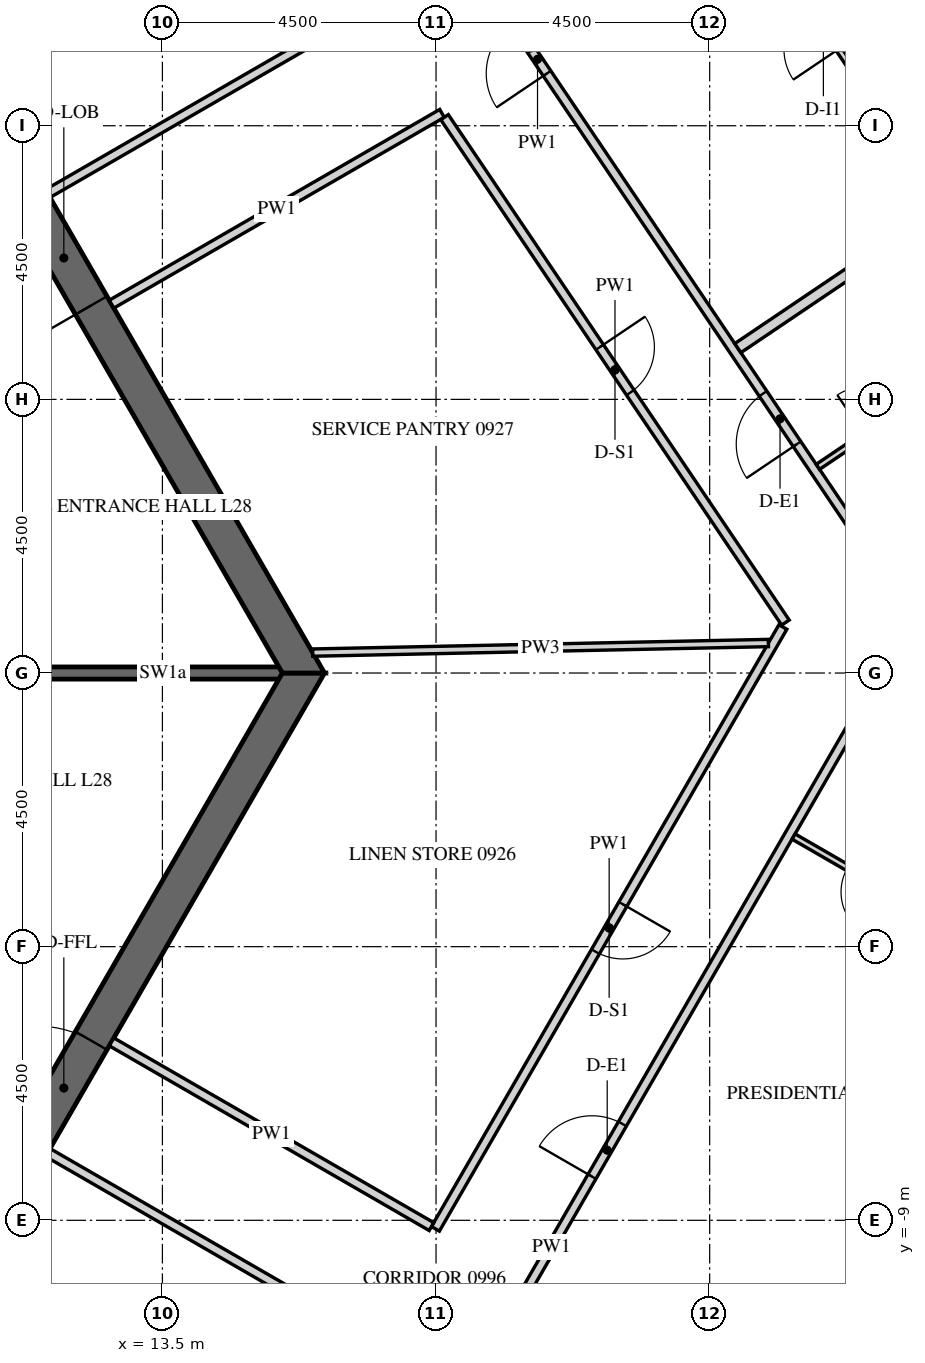
"""IFC4 building model, lengths in metres.
Left out: names, types, materials, properties, quantities, classifications, styles, units other than length and angle.
Written with IfcOpenShell. Run it as: python <this file> out.ifc"""

import sys

from ifc_helpers import new_model, si_unit, direction, frame, frame_2d, origin, place, context, subcontext, project, spatial, polyline, rectangle, outline, extrude, element, fill, save


model = new_model("IFC4")
c1 = context("Model", 3, precision=1e-05, world=origin(), true_north=direction((0.0, 1.0)))
c2 = subcontext(c1, "Body", "Model", "MODEL_VIEW")
j1 = project(units=[si_unit("LENGTHUNIT", "METRE"), si_unit("PLANEANGLEUNIT", "RADIAN")], contexts=[c1])
p1 = place(None, origin())
s1 = spatial("IfcSite", under=j1, at=p1, CompositionType="ELEMENT")
p2 = place(p1, origin())
s2 = spatial("IfcBuilding", under=s1, at=p2, CompositionType="ELEMENT")
p3 = place(p2, frame((0.0, 0.0, 123.3)))
s3 = spatial("IfcBuildingStorey", under=s2, at=p3, CompositionType="ELEMENT", Elevation=123.3)
p4 = place(p3, frame((18.83, -26.835, -0.15), z_axis=(0.0, 0.0, 1.0), x_axis=(0.500003800416, 0.866023209602, 0.0)))
e1 = element("IfcWall", 1, at=p4, inside=s3, PredefinedType="SOLIDWALL", context=c2, shape_type="SweptSolid", body=[
    extrude(outline(polyline([(-0.022, -0.275), (30.097, -0.275), (30.045, 0.275), (0.022, 0.275), (-0.022, -0.275)])), origin(), (0.0, 0.0, 1.0), 3.9),
])
p5 = place(p4, frame((1.236, 0.0, 1.05)))
e2 = element("IfcOpeningElement", 2, at=p5, cuts=e1, PredefinedType="OPENING", context=c2, shape_type="SweptSolid", body=[
    extrude(rectangle(XDim=2.4, YDim=2.4, at=frame_2d((1.2, 1.2))), frame((0.0, 0.285, 0.0), z_axis=(0.0, -1.0, 0.0), x_axis=(1.0, 0.0, 0.0)), (0.0, 0.0, 1.0), 0.57),
])
p6 = place(p4, frame((4.835, 0.0, 1.05)))
e3 = element("IfcOpeningElement", 3, at=p6, cuts=e1, PredefinedType="OPENING", context=c2, shape_type="SweptSolid", body=[
    extrude(rectangle(XDim=2.4, YDim=2.4, at=frame_2d((1.2, 1.2))), frame((0.0, 0.285, 0.0), z_axis=(0.0, -1.0, 0.0), x_axis=(1.0, 0.0, 0.0)), (0.0, 0.0, 1.0), 0.57),
])
p7 = place(p4, frame((8.436, 0.0, 1.05)))
e4 = element("IfcOpeningElement", 4, at=p7, cuts=e1, PredefinedType="OPENING", context=c2, shape_type="SweptSolid", body=[
    extrude(rectangle(XDim=2.4, YDim=2.4, at=frame_2d((1.2, 1.2))), frame((0.0, 0.285, 0.0), z_axis=(0.0, -1.0, 0.0), x_axis=(1.0, 0.0, 0.0)), (0.0, 0.0, 1.0), 0.57),
])
p8 = place(p4, frame((12.035, 0.0, 1.05)))
e5 = element("IfcOpeningElement", 5, at=p8, cuts=e1, PredefinedType="OPENING", context=c2, shape_type="SweptSolid", body=[
    extrude(rectangle(XDim=2.4, YDim=2.4, at=frame_2d((1.2, 1.2))), frame((0.0, 0.285, 0.0), z_axis=(0.0, -1.0, 0.0), x_axis=(1.0, 0.0, 0.0)), (0.0, 0.0, 1.0), 0.57),
])
p9 = place(p4, frame((15.635, 0.0, 1.05)))
e6 = element("IfcOpeningElement", 6, at=p9, cuts=e1, PredefinedType="OPENING", context=c2, shape_type="SweptSolid", body=[
    extrude(rectangle(XDim=2.4, YDim=2.4, at=frame_2d((1.2, 1.2))), frame((0.0, 0.285, 0.0), z_axis=(0.0, -1.0, 0.0), x_axis=(1.0, 0.0, 0.0)), (0.0, 0.0, 1.0), 0.57),
])
p10 = place(p4, frame((19.236, 0.0, 1.05)))
e7 = element("IfcOpeningElement", 7, at=p10, cuts=e1, PredefinedType="OPENING", context=c2, shape_type="SweptSolid", body=[
    extrude(rectangle(XDim=2.4, YDim=2.4, at=frame_2d((1.2, 1.2))), frame((0.0, 0.285, 0.0), z_axis=(0.0, -1.0, 0.0), x_axis=(1.0, 0.0, 0.0)), (0.0, 0.0, 1.0), 0.57),
])
p11 = place(p4, frame((22.835, 0.0, 1.05)))
e8 = element("IfcOpeningElement", 8, at=p11, cuts=e1, PredefinedType="OPENING", context=c2, shape_type="SweptSolid", body=[
    extrude(rectangle(XDim=2.4, YDim=2.4, at=frame_2d((1.2, 1.2))), frame((0.0, 0.285, 0.0), z_axis=(0.0, -1.0, 0.0), x_axis=(1.0, 0.0, 0.0)), (0.0, 0.0, 1.0), 0.57),
])
p12 = place(p4, frame((26.436, 0.0, 1.05)))
e9 = element("IfcOpeningElement", 9, at=p12, cuts=e1, PredefinedType="OPENING", context=c2, shape_type="SweptSolid", body=[
    extrude(rectangle(XDim=2.4, YDim=2.4, at=frame_2d((1.2, 1.2))), frame((0.0, 0.285, 0.0), z_axis=(0.0, -1.0, 0.0), x_axis=(1.0, 0.0, 0.0)), (0.0, 0.0, 1.0), 0.57),
])
p13 = place(p3, frame((33.728, 3.153, -0.15), z_axis=(0.0, 0.0, 1.0), x_axis=(-0.559192411416, 0.82903790445, 0.0)))
e10 = element("IfcWall", 10, at=p13, inside=s3, PredefinedType="SOLIDWALL", context=c2, shape_type="SweptSolid", body=[
    extrude(outline(polyline([(-0.026, -0.275), (30.093, -0.275), (30.048, 0.275), (0.026, 0.275), (-0.026, -0.275)])), origin(), (0.0, 0.0, 1.0), 3.9),
])
p14 = place(p13, frame((1.236, 0.0, 1.05)))
e11 = element("IfcOpeningElement", 11, at=p14, cuts=e10, PredefinedType="OPENING", context=c2, shape_type="SweptSolid", body=[
    extrude(rectangle(XDim=2.4, YDim=2.4, at=frame_2d((1.2, 1.2))), frame((0.0, 0.285, 0.0), z_axis=(0.0, -1.0, 0.0), x_axis=(1.0, 0.0, 0.0)), (0.0, 0.0, 1.0), 0.57),
])
p15 = place(p13, frame((4.835, 0.0, 1.05)))
e12 = element("IfcOpeningElement", 12, at=p15, cuts=e10, PredefinedType="OPENING", context=c2, shape_type="SweptSolid", body=[
    extrude(rectangle(XDim=2.4, YDim=2.4, at=frame_2d((1.2, 1.2))), frame((0.0, 0.285, 0.0), z_axis=(0.0, -1.0, 0.0), x_axis=(1.0, 0.0, 0.0)), (0.0, 0.0, 1.0), 0.57),
])
p16 = place(p13, frame((8.436, 0.0, 1.05)))
e13 = element("IfcOpeningElement", 13, at=p16, cuts=e10, PredefinedType="OPENING", context=c2, shape_type="SweptSolid", body=[
    extrude(rectangle(XDim=2.4, YDim=2.4, at=frame_2d((1.2, 1.2))), frame((0.0, 0.285, 0.0), z_axis=(0.0, -1.0, 0.0), x_axis=(1.0, 0.0, 0.0)), (0.0, 0.0, 1.0), 0.57),
])
p17 = place(p13, frame((12.035, 0.0, 1.05)))
e14 = element("IfcOpeningElement", 14, at=p17, cuts=e10, PredefinedType="OPENING", context=c2, shape_type="SweptSolid", body=[
    extrude(rectangle(XDim=2.4, YDim=2.4, at=frame_2d((1.2, 1.2))), frame((0.0, 0.285, 0.0), z_axis=(0.0, -1.0, 0.0), x_axis=(1.0, 0.0, 0.0)), (0.0, 0.0, 1.0), 0.57),
])
p18 = place(p13, frame((15.635, 0.0, 1.05)))
e15 = element("IfcOpeningElement", 15, at=p18, cuts=e10, PredefinedType="OPENING", context=c2, shape_type="SweptSolid", body=[
    extrude(rectangle(XDim=2.4, YDim=2.4, at=frame_2d((1.2, 1.2))), frame((0.0, 0.285, 0.0), z_axis=(0.0, -1.0, 0.0), x_axis=(1.0, 0.0, 0.0)), (0.0, 0.0, 1.0), 0.57),
])
p19 = place(p13, frame((19.236, 0.0, 1.05)))
e16 = element("IfcOpeningElement", 16, at=p19, cuts=e10, PredefinedType="OPENING", context=c2, shape_type="SweptSolid", body=[
    extrude(rectangle(XDim=2.4, YDim=2.4, at=frame_2d((1.2, 1.2))), frame((0.0, 0.285, 0.0), z_axis=(0.0, -1.0, 0.0), x_axis=(1.0, 0.0, 0.0)), (0.0, 0.0, 1.0), 0.57),
])
p20 = place(p13, frame((22.835, 0.0, 1.05)))
e17 = element("IfcOpeningElement", 17, at=p20, cuts=e10, PredefinedType="OPENING", context=c2, shape_type="SweptSolid", body=[
    extrude(rectangle(XDim=2.4, YDim=2.4, at=frame_2d((1.2, 1.2))), frame((0.0, 0.285, 0.0), z_axis=(0.0, -1.0, 0.0), x_axis=(1.0, 0.0, 0.0)), (0.0, 0.0, 1.0), 0.57),
])
p21 = place(p13, frame((26.436, 0.0, 1.05)))
e18 = element("IfcOpeningElement", 18, at=p21, cuts=e10, PredefinedType="OPENING", context=c2, shape_type="SweptSolid", body=[
    extrude(rectangle(XDim=2.4, YDim=2.4, at=frame_2d((1.2, 1.2))), frame((0.0, 0.285, 0.0), z_axis=(0.0, -1.0, 0.0), x_axis=(1.0, 0.0, 0.0)), (0.0, 0.0, 1.0), 0.57),
])
p22 = place(p3, frame((7.91, -13.7, -0.15), z_axis=(0.0, 0.0, 1.0), x_axis=(0.499999880136, 0.866025472988, 0.0)))
e19 = element("IfcWall", 19, at=p22, inside=s3, PredefinedType="SHEAR", context=c2, shape_type="SweptSolid", body=[
    extrude(outline(polyline([(-0.173, -0.3), (15.993, -0.3), (15.646, 0.3), (0.173, 0.3), (-0.173, -0.3)])), origin(), (0.0, 0.0, 1.0), 3.9),
])
p23 = place(p22, frame((7.039, 0.0, 0.15)))
e20 = element("IfcOpeningElement", 20, at=p23, cuts=e19, PredefinedType="OPENING", context=c2, shape_type="SweptSolid", body=[
    extrude(rectangle(XDim=1.8, YDim=2.4, at=frame_2d((0.9, 1.2))), frame((0.0, 0.31, 0.0), z_axis=(0.0, -1.0, 0.0), x_axis=(1.0, 0.0, 0.0)), (0.0, 0.0, 1.0), 0.62),
])
p24 = place(p3, frame((15.819, 0.0, -0.15), z_axis=(0.0, 0.0, 1.0), x_axis=(-0.499999880136, 0.866025472988, 0.0)))
e21 = element("IfcWall", 21, at=p24, inside=s3, PredefinedType="SHEAR", context=c2, shape_type="SweptSolid", body=[
    extrude(outline(polyline([(-0.173, -0.3), (15.993, -0.3), (15.646, 0.3), (0.173, 0.3), (-0.173, -0.3)])), origin(), (0.0, 0.0, 1.0), 3.9),
])
p25 = place(p24, frame((6.981, 0.0, 0.15)))
e22 = element("IfcOpeningElement", 22, at=p25, cuts=e21, PredefinedType="OPENING", context=c2, shape_type="SweptSolid", body=[
    extrude(rectangle(XDim=1.8, YDim=2.4, at=frame_2d((0.9, 1.2))), frame((0.0, 0.31, 0.0), z_axis=(0.0, -1.0, 0.0), x_axis=(1.0, 0.0, 0.0)), (0.0, 0.0, 1.0), 0.62),
])
p26 = place(p3, frame((11.547, 0.0, -0.15), z_axis=(0.0, 0.0, 1.0), x_axis=(1.0, 0.0, 0.0)))
e23 = element("IfcWall", 23, at=p26, inside=s3, PredefinedType="SHEAR", context=c2, shape_type="SweptSolid", body=[
    extrude(rectangle(XDim=3.926, YDim=0.2, at=frame_2d((1.963, 0.0))), origin(), (0.0, 0.0, 1.0), 3.9),
])
p27 = place(p3, frame((13.928, -19.775, 0.0), z_axis=(0.0, 0.0, 1.0), x_axis=(0.50000450071, 0.866022805283, 0.0)))
e24 = element("IfcWall", 24, at=p27, inside=s3, PredefinedType="PARTITIONING", context=c2, shape_type="SweptSolid", body=[
    extrude(rectangle(XDim=23.877, YDim=0.15, at=frame_2d((11.938, 0.0))), origin(), (0.0, 0.0, 1.0), 2.988),
])
p28 = place(p27, frame((2.043, 0.0, 0.0)))
e25 = element("IfcOpeningElement", 25, at=p28, cuts=e24, PredefinedType="OPENING", context=c2, shape_type="SweptSolid", body=[
    extrude(rectangle(XDim=1.0, YDim=2.1, at=frame_2d((0.5, 1.05))), frame((0.0, 0.085, 0.0), z_axis=(0.0, -1.0, 0.0), x_axis=(1.0, 0.0, 0.0)), (0.0, 0.0, 1.0), 0.17),
])
p29 = place(p27, frame((13.272, 0.0, 0.0)))
e26 = element("IfcOpeningElement", 26, at=p29, cuts=e24, PredefinedType="OPENING", context=c2, shape_type="SweptSolid", body=[
    extrude(rectangle(XDim=1.0, YDim=2.1, at=frame_2d((0.5, 1.05))), frame((0.0, 0.085, 0.0), z_axis=(0.0, -1.0, 0.0), x_axis=(1.0, 0.0, 0.0)), (0.0, 0.0, 1.0), 0.17),
])
p30 = place(p3, frame((25.821, 0.972, 0.0), z_axis=(0.0, 0.0, 1.0), x_axis=(-0.559193816298, 0.829036956845, 0.0)))
e27 = element("IfcWall", 27, at=p30, inside=s3, PredefinedType="PARTITIONING", context=c2, shape_type="SweptSolid", body=[
    extrude(rectangle(XDim=22.002, YDim=0.15, at=frame_2d((11.001, 0.0))), origin(), (0.0, 0.0, 1.0), 2.988),
])
p31 = place(p30, frame((3.369, 0.0, 0.0)))
e28 = element("IfcOpeningElement", 28, at=p31, cuts=e27, PredefinedType="OPENING", context=c2, shape_type="SweptSolid", body=[
    extrude(rectangle(XDim=1.0, YDim=2.1, at=frame_2d((0.5, 1.05))), frame((0.0, 0.085, 0.0), z_axis=(0.0, -1.0, 0.0), x_axis=(1.0, 0.0, 0.0)), (0.0, 0.0, 1.0), 0.17),
])
p32 = place(p30, frame((10.721, 0.0, 0.0)))
e29 = element("IfcOpeningElement", 29, at=p32, cuts=e27, PredefinedType="OPENING", context=c2, shape_type="SweptSolid", body=[
    extrude(rectangle(XDim=1.0, YDim=2.1, at=frame_2d((0.5, 1.05))), frame((0.0, 0.085, 0.0), z_axis=(0.0, -1.0, 0.0), x_axis=(1.0, 0.0, 0.0)), (0.0, 0.0, 1.0), 0.17),
])
p33 = place(p30, frame((20.852, 0.0, 0.0)))
e30 = element("IfcOpeningElement", 30, at=p33, cuts=e27, PredefinedType="OPENING", context=c2, shape_type="SweptSolid", body=[
    extrude(rectangle(XDim=1.0, YDim=2.1, at=frame_2d((0.5, 1.05))), frame((0.0, 0.085, 0.0), z_axis=(0.0, -1.0, 0.0), x_axis=(1.0, 0.0, 0.0)), (0.0, 0.0, 1.0), 0.17),
])
p34 = place(p3, frame((23.704, 0.757, 0.0), z_axis=(0.0, 0.0, 1.0), x_axis=(-0.500010297365, -0.866019458516, 0.0)))
e31 = element("IfcWall", 31, at=p34, inside=s3, PredefinedType="PARTITIONING", context=c2, shape_type="SweptSolid", body=[
    extrude(rectangle(XDim=11.429, YDim=0.15, at=frame_2d((5.714, 0.0))), origin(), (0.0, 0.0, 1.0), 2.988),
])
p35 = place(p34, frame((5.264, 0.0, 0.0)))
e32 = element("IfcOpeningElement", 32, at=p35, cuts=e31, PredefinedType="OPENING", context=c2, shape_type="SweptSolid", body=[
    extrude(rectangle(XDim=0.9, YDim=2.1, at=frame_2d((0.45, 1.05))), frame((0.0, 0.085, 0.0), z_axis=(0.0, -1.0, 0.0), x_axis=(1.0, 0.0, 0.0)), (0.0, 0.0, 1.0), 0.17),
])
p36 = place(p3, frame((17.925, -9.103, 0.0), z_axis=(0.0, 0.0, 1.0), x_axis=(-0.866013586754, 0.500020467139, 0.0)))
e33 = element("IfcWall", 33, at=p36, inside=s3, PredefinedType="PARTITIONING", context=c2, shape_type="SweptSolid", body=[
    extrude(rectangle(XDim=6.075, YDim=0.15, at=frame_2d((3.038, 0.0))), origin(), (0.0, 0.0, 1.0), 2.988),
])
p37 = place(p3, frame((12.664, 6.066, 0.0), z_axis=(0.0, 0.0, 1.0), x_axis=(0.866036561919, 0.499980673046, 0.0)))
e34 = element("IfcWall", 34, at=p37, inside=s3, PredefinedType="PARTITIONING", context=c2, shape_type="SweptSolid", body=[
    extrude(rectangle(XDim=6.275, YDim=0.15, at=frame_2d((3.137, 0.0))), origin(), (0.0, 0.0, 1.0), 2.988),
])
p38 = place(p3, frame((18.14, 9.141, 0.0), z_axis=(0.0, 0.0, 1.0), x_axis=(0.55918799196, -0.829040885389, 0.0)))
e35 = element("IfcWall", 35, at=p38, inside=s3, PredefinedType="PARTITIONING", context=c2, shape_type="SweptSolid", body=[
    extrude(rectangle(XDim=10.025, YDim=0.15, at=frame_2d((5.013, 0.0))), origin(), (0.0, 0.0, 1.0), 2.988),
])
p39 = place(p38, frame((4.563, 0.0, 0.0)))
e36 = element("IfcOpeningElement", 36, at=p39, cuts=e35, PredefinedType="OPENING", context=c2, shape_type="SweptSolid", body=[
    extrude(rectangle(XDim=0.9, YDim=2.1, at=frame_2d((0.45, 1.05))), frame((0.0, 0.085, 0.0), z_axis=(0.0, -1.0, 0.0), x_axis=(1.0, 0.0, 0.0)), (0.0, 0.0, 1.0), 0.17),
])
p40 = place(p3, frame((11.614, -7.884, 0.0), z_axis=(0.0, 0.0, 1.0), x_axis=(0.866033542371, -0.499985903289, 0.0)))
e37 = element("IfcWall", 37, at=p40, inside=s3, PredefinedType="PARTITIONING", context=c2, shape_type="SweptSolid", body=[
    extrude(rectangle(XDim=6.15, YDim=0.15, at=frame_2d((3.075, 0.0))), origin(), (0.0, 0.0, 1.0), 2.988),
])
p41 = place(p3, frame((16.855, 10.911, 0.0), z_axis=(0.0, 0.0, 1.0), x_axis=(-0.866020343444, -0.500008764664, 0.0)))
e38 = element("IfcWall", 38, at=p41, inside=s3, PredefinedType="PARTITIONING", context=c2, shape_type="SweptSolid", body=[
    extrude(rectangle(XDim=6.053, YDim=0.15, at=frame_2d((3.026, 0.0))), origin(), (0.0, 0.0, 1.0), 2.988),
])
p42 = place(p3, frame((26.413, -4.152, 0.0), z_axis=(0.0, 0.0, 1.0), x_axis=(-0.86601045545, 0.500025890382, 0.0)))
e39 = element("IfcWall", 39, at=p42, inside=s3, PredefinedType="PARTITIONING", context=c2, shape_type="SweptSolid", body=[
    extrude(rectangle(XDim=2.925, YDim=0.1, at=frame_2d((1.462, 0.0))), origin(), (0.0, 0.0, 1.0), 2.988),
])
p43 = place(p42, frame((1.1, 0.0, 0.0)))
e40 = element("IfcOpeningElement", 40, at=p43, cuts=e39, PredefinedType="OPENING", context=c2, shape_type="SweptSolid", body=[
    extrude(rectangle(XDim=0.8, YDim=2.1, at=frame_2d((0.4, 1.05))), frame((0.0, 0.06, 0.0), z_axis=(0.0, -1.0, 0.0), x_axis=(1.0, 0.0, 0.0)), (0.0, 0.0, 1.0), 0.12),
])
p44 = place(p3, frame((22.017, -15.366, 0.0), z_axis=(0.0, 0.0, 1.0), x_axis=(0.5000167099, 0.866015756104, 0.0)))
e41 = element("IfcWall", 41, at=p44, inside=s3, PredefinedType="PARTITIONING", context=c2, shape_type="SweptSolid", body=[
    extrude(rectangle(XDim=7.11, YDim=0.1, at=frame_2d((3.555, 0.0))), origin(), (0.0, 0.0, 1.0), 2.988),
])
p45 = place(p44, frame((3.06, 0.0, 0.0)))
e42 = element("IfcOpeningElement", 42, at=p45, cuts=e41, PredefinedType="OPENING", context=c2, shape_type="SweptSolid", body=[
    extrude(rectangle(XDim=0.9, YDim=2.1, at=frame_2d((0.45, 1.05))), frame((0.0, 0.06, 0.0), z_axis=(0.0, -1.0, 0.0), x_axis=(1.0, 0.0, 0.0)), (0.0, 0.0, 1.0), 0.12),
])
p46 = place(p3, frame((24.28, 3.391, 0.0), z_axis=(0.0, 0.0, 1.0), x_axis=(0.829005477618, 0.559240483226, 0.0)))
e43 = element("IfcWall", 43, at=p46, inside=s3, PredefinedType="PARTITIONING", context=c2, shape_type="SweptSolid", body=[
    extrude(rectangle(XDim=2.725, YDim=0.1, at=frame_2d((1.363, 0.0))), origin(), (0.0, 0.0, 1.0), 2.988),
])
p47 = place(p46, frame((0.925, 0.0, 0.0)))
e44 = element("IfcOpeningElement", 44, at=p47, cuts=e43, PredefinedType="OPENING", context=c2, shape_type="SweptSolid", body=[
    extrude(rectangle(XDim=0.8, YDim=2.1, at=frame_2d((0.4, 1.05))), frame((0.0, 0.06, 0.0), z_axis=(0.0, -1.0, 0.0), x_axis=(1.0, 0.0, 0.0)), (0.0, 0.0, 1.0), 0.12),
])
p48 = place(p3, frame((29.119, 9.495, 0.0), z_axis=(0.0, 0.0, 1.0), x_axis=(-0.829038452737, -0.559191598545, 0.0)))
e45 = element("IfcWall", 45, at=p48, inside=s3, PredefinedType="PARTITIONING", context=c2, shape_type="SweptSolid", body=[
    extrude(rectangle(XDim=7.425, YDim=0.18, at=frame_2d((3.713, 0.0))), origin(), (0.0, 0.0, 1.0), 2.988),
])
p49 = place(p3, frame((26.333, 7.724, 0.0), z_axis=(0.0, 0.0, 1.0), x_axis=(-0.559185029686, 0.829042883435, 0.0)))
e46 = element("IfcWall", 46, at=p49, inside=s3, PredefinedType="PARTITIONING", context=c2, shape_type="SweptSolid", body=[
    extrude(rectangle(XDim=7.11, YDim=0.1, at=frame_2d((3.555, 0.0))), origin(), (0.0, 0.0, 1.0), 2.988),
])
p50 = place(p49, frame((3.06, 0.0, 0.0)))
e47 = element("IfcOpeningElement", 47, at=p50, cuts=e46, PredefinedType="OPENING", context=c2, shape_type="SweptSolid", body=[
    extrude(rectangle(XDim=0.9, YDim=2.1, at=frame_2d((0.45, 1.05))), frame((0.0, 0.06, 0.0), z_axis=(0.0, -1.0, 0.0), x_axis=(1.0, 0.0, 0.0)), (0.0, 0.0, 1.0), 0.12),
])
p51 = place(p3, frame((23.466, 0.493, 0.0), z_axis=(0.0, 0.0, 1.0), x_axis=(-0.999779281543, -0.021009240783, 0.0)))
e48 = element("IfcWall", 48, at=p51, inside=s3, PredefinedType="PARTITIONING", context=c2, shape_type="SweptSolid", body=[
    extrude(rectangle(XDim=7.495, YDim=0.12, at=frame_2d((3.748, 0.0))), origin(), (0.0, 0.0, 1.0), 2.988),
])
p52 = place(p25, origin())
e49 = element("IfcDoor", 49, at=p52, inside=s3, OperationType="DOUBLE_DOOR_SINGLE_SWING", PredefinedType="DOOR", context=c2, shape_type="SweptSolid", body=[
    extrude(rectangle(XDim=1.8, YDim=2.4, at=frame_2d((0.9, 1.2))), frame((0.0, 0.025, 0.0), z_axis=(0.0, -1.0, 0.0), x_axis=(1.0, 0.0, 0.0)), (0.0, 0.0, 1.0), 0.05),
])
fill(e22, e49)
p53 = place(p23, origin())
e50 = element("IfcDoor", 50, at=p53, inside=s3, OperationType="DOUBLE_DOOR_SINGLE_SWING", PredefinedType="DOOR", context=c2, shape_type="SweptSolid", body=[
    extrude(rectangle(XDim=1.8, YDim=2.4, at=frame_2d((0.9, 1.2))), frame((0.0, 0.025, 0.0), z_axis=(0.0, -1.0, 0.0), x_axis=(1.0, 0.0, 0.0)), (0.0, 0.0, 1.0), 0.05),
])
fill(e20, e50)
p54 = place(p29, origin())
e51 = element("IfcDoor", 51, at=p54, inside=s3, OperationType="SINGLE_SWING_RIGHT", PredefinedType="DOOR", context=c2, shape_type="SweptSolid", body=[
    extrude(rectangle(XDim=1.0, YDim=2.1, at=frame_2d((0.5, 1.05))), frame((0.0, 0.025, 0.0), z_axis=(0.0, -1.0, 0.0), x_axis=(1.0, 0.0, 0.0)), (0.0, 0.0, 1.0), 0.05),
])
fill(e26, e51)
p55 = place(p31, origin())
e52 = element("IfcDoor", 52, at=p55, inside=s3, OperationType="SINGLE_SWING_LEFT", PredefinedType="DOOR", context=c2, shape_type="SweptSolid", body=[
    extrude(rectangle(XDim=1.0, YDim=2.1, at=frame_2d((0.5, 1.05))), frame((0.0, 0.025, 0.0), z_axis=(0.0, -1.0, 0.0), x_axis=(1.0, 0.0, 0.0)), (0.0, 0.0, 1.0), 0.05),
])
fill(e28, e52)
p56 = place(p32, origin())
e53 = element("IfcDoor", 53, at=p56, inside=s3, OperationType="SINGLE_SWING_RIGHT", PredefinedType="DOOR", context=c2, shape_type="SweptSolid", body=[
    extrude(rectangle(XDim=1.0, YDim=2.1, at=frame_2d((0.5, 1.05))), frame((0.0, 0.025, 0.0), z_axis=(0.0, -1.0, 0.0), x_axis=(1.0, 0.0, 0.0)), (0.0, 0.0, 1.0), 0.05),
])
fill(e29, e53)
p57 = place(p35, origin())
e54 = element("IfcDoor", 54, at=p57, inside=s3, OperationType="SINGLE_SWING_RIGHT", PredefinedType="DOOR", context=c2, shape_type="SweptSolid", body=[
    extrude(rectangle(XDim=0.9, YDim=2.1, at=frame_2d((0.45, 1.05))), frame((0.0, 0.025, 0.0), z_axis=(0.0, -1.0, 0.0), x_axis=(1.0, 0.0, 0.0)), (0.0, 0.0, 1.0), 0.05),
])
fill(e32, e54)
p58 = place(p39, origin())
e55 = element("IfcDoor", 55, at=p58, inside=s3, OperationType="SINGLE_SWING_RIGHT", PredefinedType="DOOR", context=c2, shape_type="SweptSolid", body=[
    extrude(rectangle(XDim=0.9, YDim=2.1, at=frame_2d((0.45, 1.05))), frame((0.0, 0.025, 0.0), z_axis=(0.0, -1.0, 0.0), x_axis=(1.0, 0.0, 0.0)), (0.0, 0.0, 1.0), 0.05),
])
fill(e36, e55)
save(model, sys.argv[1])
